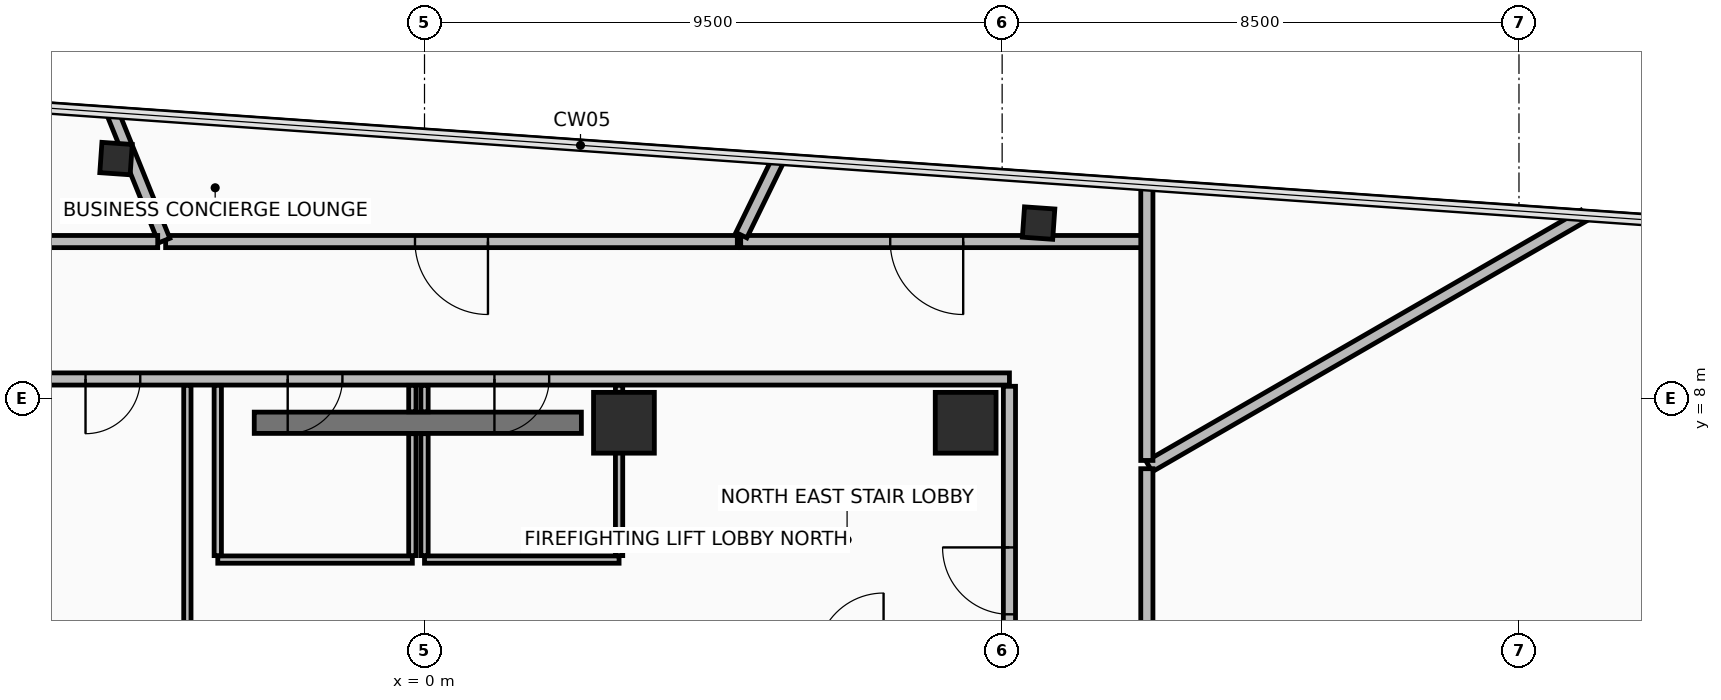
"""IFC4 building model, lengths in metres.
Left out: names, types, materials, properties, quantities, classifications, styles, units other than length and angle.
Written with IfcOpenShell. Run it as: python <this file> out.ifc"""

import sys

from ifc_helpers import new_model, si_unit, direction, frame, frame_2d, origin, origin_2d, place, context, subcontext, project, spatial, rectangle, hollow_rectangle, extrude, element, fill, save


model = new_model("IFC4")
c1 = context("Model", 3, precision=1e-05, world=origin(), true_north=direction((0.0, 1.0)))
c2 = subcontext(c1, "Body", "Model", "MODEL_VIEW")
j1 = project(units=[si_unit("LENGTHUNIT", "METRE"), si_unit("PLANEANGLEUNIT", "RADIAN")], contexts=[c1])
p1 = place(None, origin())
s1 = spatial("IfcSite", under=j1, at=p1, CompositionType="ELEMENT")
p2 = place(p1, origin())
s2 = spatial("IfcBuilding", under=s1, at=p2, CompositionType="ELEMENT")
p3 = place(p2, frame((0.0, 0.0, 234.25)))
s3 = spatial("IfcBuildingStorey", under=s2, at=p3, CompositionType="ELEMENT", Elevation=234.25)
for number, where, z_axis, x_axis in (
    (1, (8.9, 7.6, 0.0), (0.0, 0.0, 1.0), (1.0, 0.0, 0.0)),
    (2, (3.28, 7.6, 0.0), (0.0, 0.0, 1.0), (1.0, 0.0, 0.0)),
):
    element("IfcColumn", number, at=place(p3, frame(where, z_axis=z_axis, x_axis=x_axis)), inside=s3, PredefinedType="COLUMN", context=c2, shape_type="SweptSolid", body=[
        extrude(rectangle(XDim=1.0, YDim=1.0, at=origin_2d()), origin(), (0.0, 0.0, 1.0), 3.6),
    ])
for number, where, z_axis, x_axis in (
    (3, (10.1, 10.884, 0.0), (0.0, 0.0, 1.0), (-0.998, 0.07, 0.0)),
    (4, (-5.073, 11.945, 0.0), (0.0, 0.0, 1.0), (-0.998, 0.07, 0.0)),
):
    element("IfcColumn", number, at=place(p3, frame(where, z_axis=z_axis, x_axis=x_axis)), inside=s3, PredefinedType="COLUMN", context=c2, shape_type="SweptSolid", body=[
        extrude(hollow_rectangle(XDim=0.5, YDim=0.5, WallThickness=0.032, at=origin_2d()), origin(), (0.0, 0.0, 1.0), 3.6),
    ])
p4 = place(p3, frame((-2.8, 7.6, 0.0), z_axis=(0.0, 0.0, 1.0), x_axis=(1.0, 0.0, 0.0)))
e5 = element("IfcWall", 5, at=p4, inside=s3, PredefinedType="SHEAR", context=c2, shape_type="SweptSolid", body=[
    extrude(rectangle(XDim=5.38, YDim=0.35, at=frame_2d((2.69, 0.0))), origin(), (0.0, 0.0, 1.0), 3.42),
])
p5 = place(p3, frame((9.62, 8.32, 0.0), z_axis=(0.0, 0.0, 1.0), x_axis=(-1.0, 0.0, 0.0)))
e6 = element("IfcWall", 6, at=p5, inside=s3, PredefinedType="PARTITIONING", context=c2, shape_type="SweptSolid", body=[
    extrude(rectangle(XDim=19.24, YDim=0.2, at=frame_2d((9.62, 0.0))), origin(), (0.0, 0.0, 1.0), 2.915),
])
p6 = place(p5, frame((10.97, 0.0, 0.0)))
e7 = element("IfcOpeningElement", 7, at=p6, cuts=e6, PredefinedType="OPENING", context=c2, shape_type="SweptSolid", body=[
    extrude(rectangle(XDim=0.9, YDim=2.1, at=frame_2d((0.45, 1.05))), frame((0.0, 0.11, 0.0), z_axis=(0.0, -1.0, 0.0), x_axis=(1.0, 0.0, 0.0)), (0.0, 0.0, 1.0), 0.22),
])
p7 = place(p5, frame((7.57, 0.0, 0.0)))
e8 = element("IfcOpeningElement", 8, at=p7, cuts=e6, PredefinedType="OPENING", context=c2, shape_type="SweptSolid", body=[
    extrude(rectangle(XDim=0.9, YDim=2.1, at=frame_2d((0.45, 1.05))), frame((0.0, 0.11, 0.0), z_axis=(0.0, -1.0, 0.0), x_axis=(1.0, 0.0, 0.0)), (0.0, 0.0, 1.0), 0.22),
])
p8 = place(p5, frame((16.245, 0.0, 0.0)))
e9 = element("IfcOpeningElement", 9, at=p8, cuts=e6, PredefinedType="OPENING", context=c2, shape_type="SweptSolid", body=[
    extrude(rectangle(XDim=0.9, YDim=2.1, at=frame_2d((0.45, 1.05))), frame((0.0, 0.11, 0.0), z_axis=(0.0, -1.0, 0.0), x_axis=(1.0, 0.0, 0.0)), (0.0, 0.0, 1.0), 0.22),
])
p9 = place(p5, frame((14.295, 0.0, 0.0)))
e10 = element("IfcOpeningElement", 10, at=p9, cuts=e6, PredefinedType="OPENING", context=c2, shape_type="SweptSolid", body=[
    extrude(rectangle(XDim=0.9, YDim=2.1, at=frame_2d((0.45, 1.05))), frame((0.0, 0.11, 0.0), z_axis=(0.0, -1.0, 0.0), x_axis=(1.0, 0.0, 0.0)), (0.0, 0.0, 1.0), 0.22),
])
p10 = place(p3, frame((9.62, -8.2, 0.0), z_axis=(0.0, 0.0, 1.0), x_axis=(0.0, 1.0, 0.0)))
e11 = element("IfcWall", 11, at=p10, inside=s3, PredefinedType="PARTITIONING", context=c2, shape_type="SweptSolid", body=[
    extrude(rectangle(XDim=16.4, YDim=0.2, at=frame_2d((8.2, 0.0))), origin(), (0.0, 0.0, 1.0), 2.915),
])
p11 = place(p10, frame((12.65, 0.0, 0.0)))
e12 = element("IfcOpeningElement", 12, at=p11, cuts=e11, PredefinedType="OPENING", context=c2, shape_type="SweptSolid", body=[
    extrude(rectangle(XDim=1.1, YDim=2.15, at=frame_2d((0.55, 1.075))), frame((0.0, 0.11, 0.0), z_axis=(0.0, -1.0, 0.0), x_axis=(1.0, 0.0, 0.0)), (0.0, 0.0, 1.0), 0.22),
])
p12 = place(p3, frame((-3.4, 5.35, 0.0), z_axis=(0.0, 0.0, 1.0), x_axis=(1.0, 0.0, 0.0)))
e13 = element("IfcWall", 13, at=p12, inside=s3, PredefinedType="PARTITIONING", context=c2, shape_type="SweptSolid", body=[
    extrude(rectangle(XDim=3.2, YDim=0.12, at=frame_2d((1.6, 0.0))), origin(), (0.0, 0.0, 1.0), 3.42),
])
p13 = place(p3, frame((-0.2, 5.415, 0.0), z_axis=(0.0, 0.0, 1.0), x_axis=(0.0, 1.0, 0.0)))
e14 = element("IfcWall", 14, at=p13, inside=s3, PredefinedType="PARTITIONING", context=c2, shape_type="SweptSolid", body=[
    extrude(rectangle(XDim=2.005, YDim=0.12, at=frame_2d((1.002, 0.0))), origin(), (0.0, 0.0, 1.0), 2.715),
])
p14 = place(p3, frame((-0.2, 7.78, 0.0), z_axis=(0.0, 0.0, 1.0), x_axis=(0.0, 1.0, 0.0)))
e15 = element("IfcWall", 15, at=p14, inside=s3, PredefinedType="PARTITIONING", context=c2, shape_type="SweptSolid", body=[
    extrude(rectangle(XDim=0.435, YDim=0.12, at=frame_2d((0.218, 0.0))), origin(), (0.0, 0.0, 1.0), 2.715),
])
p15 = place(p3, frame((-3.4, 8.215, 0.0), z_axis=(0.0, 0.0, 1.0), x_axis=(0.0, -1.0, 0.0)))
e16 = element("IfcWall", 16, at=p15, inside=s3, PredefinedType="PARTITIONING", context=c2, shape_type="SweptSolid", body=[
    extrude(rectangle(XDim=2.8, YDim=0.12, at=frame_2d((1.4, 0.0))), origin(), (0.0, 0.0, 1.0), 2.715),
])
p16 = place(p3, frame((0.0, 5.35, 0.0), z_axis=(0.0, 0.0, 1.0), x_axis=(1.0, 0.0, 0.0)))
e17 = element("IfcWall", 17, at=p16, inside=s3, PredefinedType="PARTITIONING", context=c2, shape_type="SweptSolid", body=[
    extrude(rectangle(XDim=3.2, YDim=0.12, at=frame_2d((1.6, 0.0))), origin(), (0.0, 0.0, 1.0), 2.715),
])
p17 = place(p3, frame((3.2, 5.415, 0.0), z_axis=(0.0, 0.0, 1.0), x_axis=(0.0, 1.0, 0.0)))
e18 = element("IfcWall", 18, at=p17, inside=s3, PredefinedType="PARTITIONING", context=c2, shape_type="SweptSolid", body=[
    extrude(rectangle(XDim=2.8, YDim=0.12, at=frame_2d((1.4, 0.0))), origin(), (0.0, 0.0, 1.0), 2.715),
])
p18 = place(p3, frame((0.0, 8.215, 0.0), z_axis=(0.0, 0.0, 1.0), x_axis=(0.0, -1.0, 0.0)))
e19 = element("IfcWall", 19, at=p18, inside=s3, PredefinedType="PARTITIONING", context=c2, shape_type="SweptSolid", body=[
    extrude(rectangle(XDim=0.435, YDim=0.12, at=frame_2d((0.218, 0.0))), origin(), (0.0, 0.0, 1.0), 2.715),
])
p19 = place(p3, frame((0.0, 7.42, 0.0), z_axis=(0.0, 0.0, 1.0), x_axis=(0.0, -1.0, 0.0)))
e20 = element("IfcWall", 20, at=p19, inside=s3, PredefinedType="PARTITIONING", context=c2, shape_type="SweptSolid", body=[
    extrude(rectangle(XDim=2.005, YDim=0.12, at=frame_2d((1.002, 0.0))), origin(), (0.0, 0.0, 1.0), 2.715),
])
p20 = place(p3, frame((-3.9, 4.265, 0.0), z_axis=(0.0, 0.0, 1.0), x_axis=(0.0, 1.0, 0.0)))
e21 = element("IfcWall", 21, at=p20, inside=s3, PredefinedType="PARTITIONING", context=c2, shape_type="SweptSolid", body=[
    extrude(rectangle(XDim=3.95, YDim=0.12, at=frame_2d((1.975, 0.0))), origin(), (0.0, 0.0, 1.0), 2.715),
])
p21 = place(p3, frame((11.879, 10.58, 0.0), z_axis=(0.0, 0.0, 1.0), x_axis=(-1.0, 0.0, 0.0)))
e22 = element("IfcWall", 22, at=p21, inside=s3, PredefinedType="PARTITIONING", context=c2, shape_type="SweptSolid", body=[
    extrude(rectangle(XDim=6.679, YDim=0.2, at=frame_2d((3.34, 0.0))), origin(), (0.0, 0.0, 1.0), 2.765),
])
p22 = place(p21, frame((3.02, 0.0, 0.0)))
e23 = element("IfcOpeningElement", 23, at=p22, cuts=e22, PredefinedType="OPENING", context=c2, shape_type="SweptSolid", body=[
    extrude(rectangle(XDim=1.2, YDim=2.15, at=frame_2d((0.6, 1.075))), frame((0.0, 0.11, 0.0), z_axis=(0.0, -1.0, 0.0), x_axis=(1.0, 0.0, 0.0)), (0.0, 0.0, 1.0), 0.22),
])
p23 = place(p3, frame((5.211, 10.685, 0.0), z_axis=(0.0, 0.0, 1.0), x_axis=(0.438374597956, 0.898792363044, 0.0)))
e24 = element("IfcWall", 24, at=p23, inside=s3, PredefinedType="PARTITIONING", context=c2, shape_type="SweptSolid", body=[
    extrude(rectangle(XDim=1.373, YDim=0.2, at=frame_2d((0.687, 0.0))), origin(), (0.0, 0.0, 1.0), 2.765),
])
p24 = place(p3, frame((19.067, 11.008, 0.0), z_axis=(0.0, 0.0, 1.0), x_axis=(-0.86603440109, -0.499984415886, 0.0)))
e25 = element("IfcWall", 25, at=p24, inside=s3, PredefinedType="PARTITIONING", context=c2, shape_type="SweptSolid", body=[
    extrude(rectangle(XDim=8.256, YDim=0.2, at=frame_2d((4.128, 0.0))), origin(), (0.0, 0.0, 1.0), 2.765),
])
p25 = place(p3, frame((11.88, 6.98, 0.0), z_axis=(0.0, 0.0, 1.0), x_axis=(0.0, 1.0, 0.0)))
e26 = element("IfcWall", 26, at=p25, inside=s3, PredefinedType="PARTITIONING", context=c2, shape_type="SweptSolid", body=[
    extrude(rectangle(XDim=4.531, YDim=0.2, at=frame_2d((2.265, 0.0))), origin(), (0.0, 0.0, 1.0), 2.765),
])
p26 = place(p3, frame((5.145, 10.58, 0.0), z_axis=(0.0, 0.0, 1.0), x_axis=(-1.0, 0.0, 0.0)))
e27 = element("IfcWall", 27, at=p26, inside=s3, PredefinedType="PARTITIONING", context=c2, shape_type="SweptSolid", body=[
    extrude(rectangle(XDim=9.402, YDim=0.2, at=frame_2d((4.701, 0.0))), origin(), (0.0, 0.0, 1.0), 3.42),
])
p27 = place(p26, frame((4.101, 0.0, 0.0)))
e28 = element("IfcOpeningElement", 28, at=p27, cuts=e27, PredefinedType="OPENING", context=c2, shape_type="SweptSolid", body=[
    extrude(rectangle(XDim=1.2, YDim=2.15, at=frame_2d((0.6, 1.075))), frame((0.0, 0.11, 0.0), z_axis=(0.0, -1.0, 0.0), x_axis=(1.0, 0.0, 0.0)), (0.0, 0.0, 1.0), 0.22),
])
p28 = place(p3, frame((-4.281, 10.596, 0.0), z_axis=(0.0, 0.0, 1.0), x_axis=(-0.374559063523, 0.927203056473, 0.0)))
e29 = element("IfcWall", 29, at=p28, inside=s3, PredefinedType="PARTITIONING", context=c2, shape_type="SweptSolid", body=[
    extrude(rectangle(XDim=2.27, YDim=0.2, at=frame_2d((1.135, 0.0))), origin(), (0.0, 0.0, 1.0), 2.765),
])
p29 = place(p3, frame((-4.388, 10.58, 0.0), z_axis=(0.0, 0.0, 1.0), x_axis=(-1.0, 0.0, 0.0)))
e30 = element("IfcWall", 30, at=p29, inside=s3, PredefinedType="PARTITIONING", context=c2, shape_type="SweptSolid", body=[
    extrude(rectangle(XDim=7.492, YDim=0.2, at=frame_2d((3.746, 0.0))), origin(), (0.0, 0.0, 1.0), 2.915),
])
p30 = place(p29, frame((3.146, 0.0, 0.0)))
e31 = element("IfcOpeningElement", 31, at=p30, cuts=e30, PredefinedType="OPENING", context=c2, shape_type="SweptSolid", body=[
    extrude(rectangle(XDim=1.2, YDim=2.15, at=frame_2d((0.6, 1.075))), frame((0.0, 0.11, 0.0), z_axis=(0.0, -1.0, 0.0), x_axis=(1.0, 0.0, 0.0)), (0.0, 0.0, 1.0), 0.22),
])
p31 = place(p3, frame((11.88, -1.648, 0.0), z_axis=(0.0, 0.0, 1.0), x_axis=(0.0, 1.0, 0.0)))
e32 = element("IfcWall", 32, at=p31, inside=s3, PredefinedType="PARTITIONING", context=c2, shape_type="SweptSolid", body=[
    extrude(rectangle(XDim=8.492, YDim=0.2, at=frame_2d((4.246, 0.0))), origin(), (0.0, 0.0, 1.0), 3.42),
])
p32 = place(p31, frame((3.796, 0.0, 0.0)))
e33 = element("IfcOpeningElement", 33, at=p32, cuts=e32, PredefinedType="OPENING", context=c2, shape_type="SweptSolid", body=[
    extrude(rectangle(XDim=0.9, YDim=2.1, at=frame_2d((0.45, 1.05))), frame((0.0, 0.11, 0.0), z_axis=(0.0, -1.0, 0.0), x_axis=(1.0, 0.0, 0.0)), (0.0, 0.0, 1.0), 0.22),
])
p33 = place(p11, frame((1.1, 0.0, 0.0), z_axis=(0.0, 0.0, 1.0), x_axis=(-1.0, 0.0, 0.0)))
e34 = element("IfcDoor", 34, at=p33, inside=s3, OperationType="SINGLE_SWING_LEFT", PredefinedType="DOOR", context=c2, shape_type="SweptSolid", body=[
    extrude(rectangle(XDim=1.1, YDim=2.15, at=frame_2d((0.55, 1.075))), frame((0.0, 0.025, 0.0), z_axis=(0.0, -1.0, 0.0), x_axis=(1.0, 0.0, 0.0)), (0.0, 0.0, 1.0), 0.05),
])
fill(e12, e34)
p34 = place(p6, frame((0.9, 0.0, 0.0), z_axis=(0.0, 0.0, 1.0), x_axis=(-1.0, 0.0, 0.0)))
e35 = element("IfcDoor", 35, at=p34, inside=s3, OperationType="SINGLE_SWING_LEFT", PredefinedType="DOOR", context=c2, shape_type="SweptSolid", body=[
    extrude(rectangle(XDim=0.9, YDim=2.1, at=frame_2d((0.45, 1.05))), frame((0.0, 0.025, 0.0), z_axis=(0.0, -1.0, 0.0), x_axis=(1.0, 0.0, 0.0)), (0.0, 0.0, 1.0), 0.05),
])
fill(e7, e35)
p35 = place(p7, frame((0.9, 0.0, 0.0), z_axis=(0.0, 0.0, 1.0), x_axis=(-1.0, 0.0, 0.0)))
e36 = element("IfcDoor", 36, at=p35, inside=s3, OperationType="SINGLE_SWING_LEFT", PredefinedType="DOOR", context=c2, shape_type="SweptSolid", body=[
    extrude(rectangle(XDim=0.9, YDim=2.1, at=frame_2d((0.45, 1.05))), frame((0.0, 0.025, 0.0), z_axis=(0.0, -1.0, 0.0), x_axis=(1.0, 0.0, 0.0)), (0.0, 0.0, 1.0), 0.05),
])
fill(e8, e36)
p36 = place(p9, frame((0.9, 0.0, 0.0), z_axis=(0.0, 0.0, 1.0), x_axis=(-1.0, 0.0, 0.0)))
e37 = element("IfcDoor", 37, at=p36, inside=s3, OperationType="SINGLE_SWING_LEFT", PredefinedType="DOOR", context=c2, shape_type="SweptSolid", body=[
    extrude(rectangle(XDim=0.9, YDim=2.1, at=frame_2d((0.45, 1.05))), frame((0.0, 0.025, 0.0), z_axis=(0.0, -1.0, 0.0), x_axis=(1.0, 0.0, 0.0)), (0.0, 0.0, 1.0), 0.05),
])
fill(e10, e37)
p37 = place(p22, origin())
e38 = element("IfcDoor", 38, at=p37, inside=s3, OperationType="SINGLE_SWING_LEFT", PredefinedType="DOOR", context=c2, shape_type="SweptSolid", body=[
    extrude(rectangle(XDim=1.2, YDim=2.15, at=frame_2d((0.6, 1.075))), frame((0.0, 0.025, 0.0), z_axis=(0.0, -1.0, 0.0), x_axis=(1.0, 0.0, 0.0)), (0.0, 0.0, 1.0), 0.05),
])
fill(e23, e38)
p38 = place(p27, origin())
e39 = element("IfcDoor", 39, at=p38, inside=s3, OperationType="SINGLE_SWING_LEFT", PredefinedType="DOOR", context=c2, shape_type="SweptSolid", body=[
    extrude(rectangle(XDim=1.2, YDim=2.15, at=frame_2d((0.6, 1.075))), frame((0.0, 0.025, 0.0), z_axis=(0.0, -1.0, 0.0), x_axis=(1.0, 0.0, 0.0)), (0.0, 0.0, 1.0), 0.05),
])
fill(e28, e39)
save(model, sys.argv[1])
